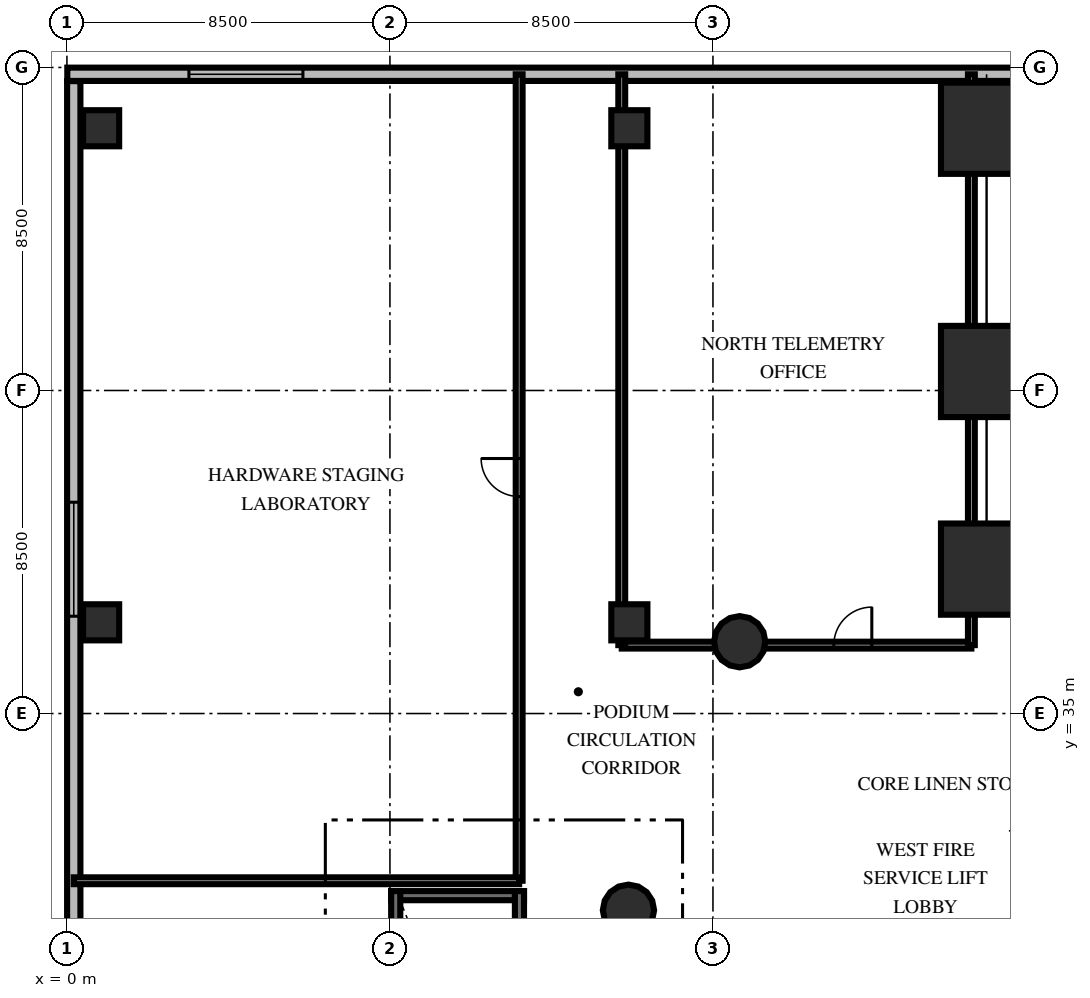
"""IFC4 building model, lengths in metres.
Left out: names, types, materials, properties, quantities, classifications, styles, units other than length and angle.
Written with IfcOpenShell. Run it as: python <this file> out.ifc"""

import sys

from ifc_helpers import new_model, si_unit, direction, frame, frame_2d, origin, origin_2d, place, context, subcontext, project, spatial, rectangle, circle, extrude, element, fill, save


model = new_model("IFC4")
c1 = context("Model", 3, precision=1e-05, world=origin(), true_north=direction((0.0, 1.0)))
c2 = subcontext(c1, "Body", "Model", "MODEL_VIEW")
j1 = project(units=[si_unit("LENGTHUNIT", "METRE"), si_unit("PLANEANGLEUNIT", "RADIAN")], contexts=[c1])
p1 = place(None, origin())
s1 = spatial("IfcSite", under=j1, at=p1, CompositionType="ELEMENT")
p2 = place(p1, origin())
s2 = spatial("IfcBuilding", under=s1, at=p2, CompositionType="ELEMENT")
p3 = place(p2, frame((0.0, 0.0, 10.2)))
s3 = spatial("IfcBuildingStorey", under=s2, at=p3, CompositionType="ELEMENT", Elevation=10.2)
p4 = place(p3, frame((8.532, 30.208, 0.0), z_axis=(0.0, 0.0, 1.0), x_axis=(1.0, 0.0, 0.0)))
e1 = element("IfcWall", 1, at=p4, inside=s3, PredefinedType="SHEAR", context=c2, shape_type="SweptSolid", body=[
    extrude(rectangle(XDim=3.496, YDim=0.24, at=frame_2d((1.748, 0.0))), origin(), (0.0, 0.0, 1.0), 5.4),
])
p5 = place(p3, frame((8.652, 20.772, 0.0), z_axis=(0.0, 0.0, 1.0), x_axis=(0.0, 1.0, 0.0)))
e2 = element("IfcWall", 2, at=p5, inside=s3, PredefinedType="SHEAR", context=c2, shape_type="SweptSolid", body=[
    extrude(rectangle(XDim=9.556, YDim=0.24, at=frame_2d((4.778, 0.0))), origin(), (0.0, 0.0, 1.0), 5.4),
])
p6 = place(p3, frame((11.908, 20.772, 0.0), z_axis=(0.0, 0.0, 1.0), x_axis=(0.0, 1.0, 0.0)))
e3 = element("IfcWall", 3, at=p6, inside=s3, PredefinedType="SHEAR", context=c2, shape_type="SweptSolid", body=[
    extrude(rectangle(XDim=9.556, YDim=0.24, at=frame_2d((4.778, 0.0))), origin(), (0.0, 0.0, 1.0), 5.4),
])
p7 = place(p6, frame((0.55, 0.0, 0.0)))
e4 = element("IfcOpeningElement", 4, at=p7, cuts=e3, PredefinedType="OPENING", context=c2, shape_type="SweptSolid", body=[
    extrude(rectangle(XDim=1.05, YDim=2.15, at=frame_2d((0.525, 1.075))), frame((0.0, 0.13, 0.0), z_axis=(0.0, -1.0, 0.0), x_axis=(1.0, 0.0, 0.0)), (0.0, 0.0, 1.0), 0.26),
])
for number, where, z_axis, x_axis in (
    (5, (24.2, 38.8, 0.0), (0.0, 0.0, 1.0), (1.0, 0.0, 0.0)),
    (6, (24.2, 44.0, 0.0), (0.0, 0.0, 1.0), (1.0, 0.0, 0.0)),
    (7, (24.2, 50.4, 0.0), (0.0, 0.0, 1.0), (1.0, 0.0, 0.0)),
):
    element("IfcColumn", number, at=place(p3, frame(where, z_axis=z_axis, x_axis=x_axis)), inside=s3, PredefinedType="USERDEFINED", context=c2, shape_type="SweptSolid", body=[
        extrude(rectangle(XDim=2.4, YDim=2.4, at=origin_2d()), origin(), (0.0, 0.0, 1.0), 5.4),
    ])
for number, where, z_axis, x_axis in (
    (8, (0.9, 37.4, 0.0), (0.0, 0.0, 1.0), (1.0, 0.0, 0.0)),
    (9, (0.9, 50.4, 0.0), (0.0, 0.0, 1.0), (1.0, 0.0, 0.0)),
    (10, (14.8, 37.4, 0.0), (0.0, 0.0, 1.0), (1.0, 0.0, 0.0)),
    (11, (14.8, 50.4, 0.0), (0.0, 0.0, 1.0), (1.0, 0.0, 0.0)),
):
    element("IfcColumn", number, at=place(p3, frame(where, z_axis=z_axis, x_axis=x_axis)), inside=s3, PredefinedType="COLUMN", context=c2, shape_type="SweptSolid", body=[
        extrude(rectangle(XDim=0.95, YDim=0.95, at=origin_2d()), origin(), (0.0, 0.0, 1.0), 5.4),
    ])
for number, where, z_axis, x_axis in (
    (12, (17.703, 36.889, 0.0), (0.0, 0.0, 1.0), (1.0, 0.0, 0.0)),
    (13, (14.777, 29.824, 0.0), (0.0, 0.0, 1.0), (1.0, 0.0, 0.0)),
):
    element("IfcColumn", number, at=place(p3, frame(where, z_axis=z_axis, x_axis=x_axis)), inside=s3, PredefinedType="COLUMN", context=c2, shape_type="SweptSolid", body=[
        extrude(circle(Radius=0.675, at=origin_2d()), origin(), (0.0, 0.0, 1.0), 5.4),
    ])
p8 = place(p3, frame((0.18, 0.36, 0.0), z_axis=(0.0, 0.0, 1.0), x_axis=(0.0, 1.0, 0.0)))
e14 = element("IfcWall", 14, at=p8, inside=s3, PredefinedType="SOLIDWALL", context=c2, shape_type="SweptSolid", body=[
    extrude(rectangle(XDim=51.28, YDim=0.35, at=frame_2d((25.64, 0.0))), origin(), (0.0, 0.0, 1.0), 4.36),
])
p9 = place(p8, frame((3.2, 0.0, 0.85)))
e15 = element("IfcOpeningElement", 15, at=p9, cuts=e14, PredefinedType="OPENING", context=c2, shape_type="SweptSolid", body=[
    extrude(rectangle(XDim=3.0, YDim=2.4, at=frame_2d((1.5, 1.2))), frame((0.0, 0.185, 0.0), z_axis=(0.0, -1.0, 0.0), x_axis=(1.0, 0.0, 0.0)), (0.0, 0.0, 1.0), 0.37),
])
p10 = place(p8, frame((11.7, 0.0, 0.85)))
e16 = element("IfcOpeningElement", 16, at=p10, cuts=e14, PredefinedType="OPENING", context=c2, shape_type="SweptSolid", body=[
    extrude(rectangle(XDim=3.0, YDim=2.4, at=frame_2d((1.5, 1.2))), frame((0.0, 0.185, 0.0), z_axis=(0.0, -1.0, 0.0), x_axis=(1.0, 0.0, 0.0)), (0.0, 0.0, 1.0), 0.37),
])
p11 = place(p8, frame((22.05, 0.0, 0.85)))
e17 = element("IfcOpeningElement", 17, at=p11, cuts=e14, PredefinedType="OPENING", context=c2, shape_type="SweptSolid", body=[
    extrude(rectangle(XDim=3.0, YDim=2.4, at=frame_2d((1.5, 1.2))), frame((0.0, 0.185, 0.0), z_axis=(0.0, -1.0, 0.0), x_axis=(1.0, 0.0, 0.0)), (0.0, 0.0, 1.0), 0.37),
])
p12 = place(p8, frame((37.2, 0.0, 0.85)))
e18 = element("IfcOpeningElement", 18, at=p12, cuts=e14, PredefinedType="OPENING", context=c2, shape_type="SweptSolid", body=[
    extrude(rectangle(XDim=3.0, YDim=2.4, at=frame_2d((1.5, 1.2))), frame((0.0, 0.185, 0.0), z_axis=(0.0, -1.0, 0.0), x_axis=(1.0, 0.0, 0.0)), (0.0, 0.0, 1.0), 0.37),
])
p13 = place(p3, frame((0.01, 51.82, 0.0), z_axis=(0.0, 0.0, 1.0), x_axis=(1.0, 0.0, 0.0)))
e19 = element("IfcWall", 19, at=p13, inside=s3, PredefinedType="SOLIDWALL", context=c2, shape_type="SweptSolid", body=[
    extrude(rectangle(XDim=25.37, YDim=0.35, at=frame_2d((12.685, 0.0))), origin(), (0.0, 0.0, 1.0), 4.36),
])
p14 = place(p13, frame((3.2, 0.0, 0.85)))
e20 = element("IfcOpeningElement", 20, at=p14, cuts=e19, PredefinedType="OPENING", context=c2, shape_type="SweptSolid", body=[
    extrude(rectangle(XDim=3.0, YDim=2.4, at=frame_2d((1.5, 1.2))), frame((0.0, 0.185, 0.0), z_axis=(0.0, -1.0, 0.0), x_axis=(1.0, 0.0, 0.0)), (0.0, 0.0, 1.0), 0.37),
])
p15 = place(p3, frame((11.9, 30.6, 0.0), z_axis=(0.0, 0.0, 1.0), x_axis=(0.0, 1.0, 0.0)))
e21 = element("IfcWall", 21, at=p15, inside=s3, PredefinedType="PARTITIONING", context=c2, shape_type="SweptSolid", body=[
    extrude(rectangle(XDim=21.22, YDim=0.18, at=frame_2d((10.61, 0.0))), origin(), (0.0, 0.0, 1.0), 3.21),
])
p16 = place(p15, frame((10.11, 0.0, 0.0)))
e22 = element("IfcOpeningElement", 22, at=p16, cuts=e21, PredefinedType="OPENING", context=c2, shape_type="SweptSolid", body=[
    extrude(rectangle(XDim=1.0, YDim=2.15, at=frame_2d((0.5, 1.075))), frame((0.0, 0.1, 0.0), z_axis=(0.0, -1.0, 0.0), x_axis=(1.0, 0.0, 0.0)), (0.0, 0.0, 1.0), 0.2),
])
p17 = place(p3, frame((0.18, 30.6, 0.0), z_axis=(0.0, 0.0, 1.0), x_axis=(1.0, 0.0, 0.0)))
e23 = element("IfcWall", 23, at=p17, inside=s3, PredefinedType="PARTITIONING", context=c2, shape_type="SweptSolid", body=[
    extrude(rectangle(XDim=11.72, YDim=0.18, at=frame_2d((5.86, 0.0))), origin(), (0.0, 0.0, 1.0), 3.21),
])
p18 = place(p3, frame((14.6, 36.8, 0.0), z_axis=(0.0, 0.0, 1.0), x_axis=(1.0, 0.0, 0.0)))
e24 = element("IfcWall", 24, at=p18, inside=s3, PredefinedType="PARTITIONING", context=c2, shape_type="SweptSolid", body=[
    extrude(rectangle(XDim=9.2, YDim=0.18, at=frame_2d((4.6, 0.0))), origin(), (0.0, 0.0, 1.0), 3.21),
])
p19 = place(p18, frame((5.58, 0.0, 0.0)))
e25 = element("IfcOpeningElement", 25, at=p19, cuts=e24, PredefinedType="OPENING", context=c2, shape_type="SweptSolid", body=[
    extrude(rectangle(XDim=1.0, YDim=2.15, at=frame_2d((0.5, 1.075))), frame((0.0, 0.1, 0.0), z_axis=(0.0, -1.0, 0.0), x_axis=(1.0, 0.0, 0.0)), (0.0, 0.0, 1.0), 0.2),
])
for number, where, z_axis, x_axis in (
    (26, (23.8, 36.8, 0.0), (0.0, 0.0, 1.0), (0.0, 1.0, 0.0)),
    (27, (14.6, 51.82, 0.0), (0.0, 0.0, 1.0), (0.0, -1.0, 0.0)),
):
    element("IfcWall", number, at=place(p3, frame(where, z_axis=z_axis, x_axis=x_axis)), inside=s3, PredefinedType="PARTITIONING", context=c2, shape_type="SweptSolid", body=[
        extrude(rectangle(XDim=15.02, YDim=0.18, at=frame_2d((7.51, 0.0))), origin(), (0.0, 0.0, 1.0), 3.21),
    ])
p20 = place(p12, origin())
e28 = element("IfcWindow", 28, at=p20, inside=s3, PartitioningType="SINGLE_PANEL", PredefinedType="WINDOW", context=c2, shape_type="SweptSolid", body=[
    extrude(rectangle(XDim=3.0, YDim=2.4, at=frame_2d((1.5, 1.2))), frame((0.0, 0.03, 0.0), z_axis=(0.0, -1.0, 0.0), x_axis=(1.0, 0.0, 0.0)), (0.0, 0.0, 1.0), 0.06),
])
fill(e18, e28)
p21 = place(p14, origin())
e29 = element("IfcWindow", 29, at=p21, inside=s3, PartitioningType="SINGLE_PANEL", PredefinedType="WINDOW", context=c2, shape_type="SweptSolid", body=[
    extrude(rectangle(XDim=3.0, YDim=2.4, at=frame_2d((1.5, 1.2))), frame((0.0, 0.03, 0.0), z_axis=(0.0, -1.0, 0.0), x_axis=(1.0, 0.0, 0.0)), (0.0, 0.0, 1.0), 0.06),
])
fill(e20, e29)
p22 = place(p16, origin())
e30 = element("IfcDoor", 30, at=p22, inside=s3, OperationType="SINGLE_SWING_RIGHT", PredefinedType="DOOR", context=c2, shape_type="SweptSolid", body=[
    extrude(rectangle(XDim=1.0, YDim=2.15, at=frame_2d((0.5, 1.075))), frame((0.0, 0.025, 0.0), z_axis=(0.0, -1.0, 0.0), x_axis=(1.0, 0.0, 0.0)), (0.0, 0.0, 1.0), 0.05),
])
fill(e22, e30)
p23 = place(p19, origin())
e31 = element("IfcDoor", 31, at=p23, inside=s3, OperationType="SINGLE_SWING_RIGHT", PredefinedType="DOOR", context=c2, shape_type="SweptSolid", body=[
    extrude(rectangle(XDim=1.0, YDim=2.15, at=frame_2d((0.5, 1.075))), frame((0.0, 0.025, 0.0), z_axis=(0.0, -1.0, 0.0), x_axis=(1.0, 0.0, 0.0)), (0.0, 0.0, 1.0), 0.05),
])
fill(e25, e31)
save(model, sys.argv[1])
